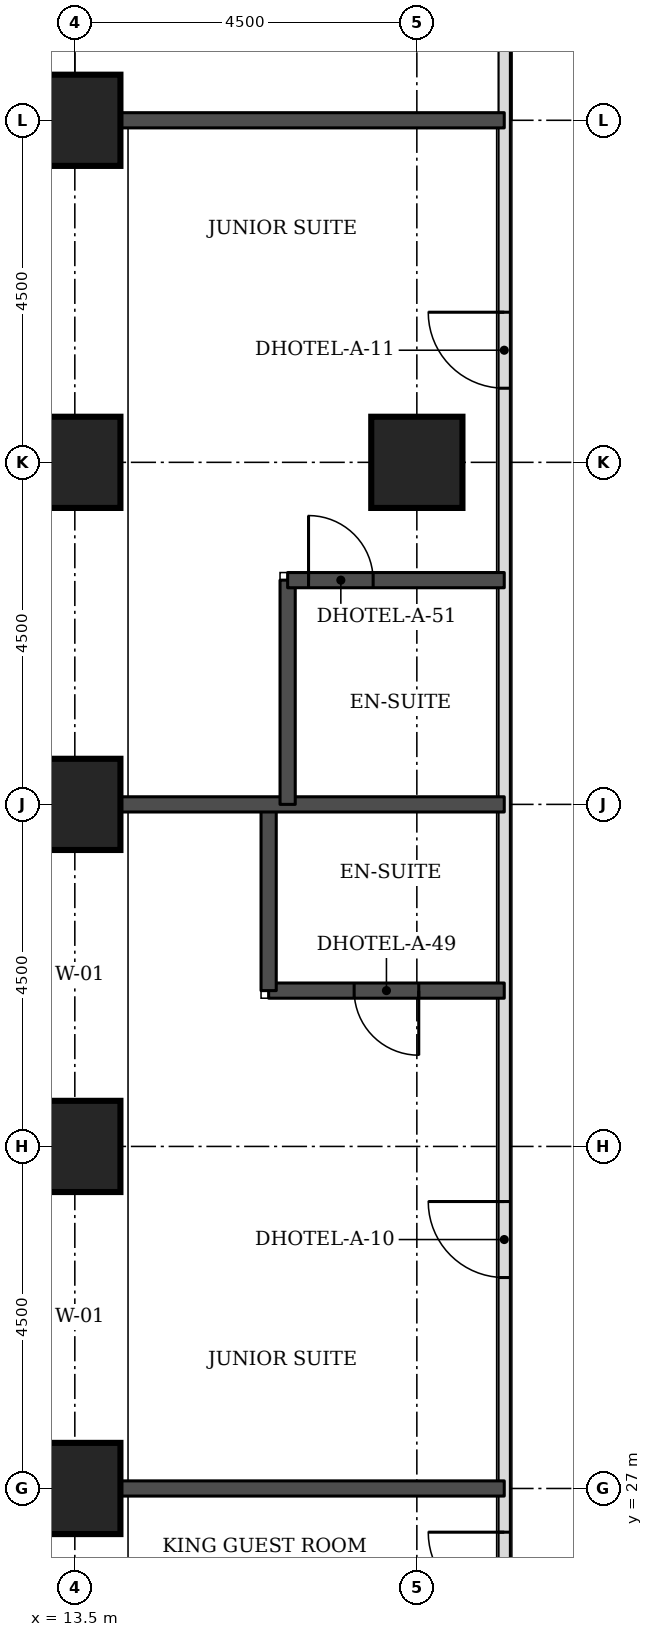
"""IFC4 building model, lengths in metres.
Left out: names, types, materials, properties, quantities, classifications, styles, units other than length and angle.
Written with IfcOpenShell. Run it as: python <this file> out.ifc"""

import sys

from ifc_helpers import new_model, si_unit, direction, frame, frame_2d, origin, origin_2d, place, context, subcontext, project, spatial, rectangle, extrude, element, fill, save


model = new_model("IFC4")
c1 = context("Model", 3, precision=1e-05, world=origin(), true_north=direction((0.0, 1.0)))
c2 = subcontext(c1, "Body", "Model", "MODEL_VIEW")
j1 = project(units=[si_unit("LENGTHUNIT", "METRE"), si_unit("PLANEANGLEUNIT", "RADIAN")], contexts=[c1])
p1 = place(None, origin())
s1 = spatial("IfcSite", under=j1, at=p1, CompositionType="ELEMENT")
p2 = place(p1, origin())
s2 = spatial("IfcBuilding", under=s1, at=p2, CompositionType="ELEMENT")
p3 = place(p2, frame((0.0, 0.0, 49.5)))
s3 = spatial("IfcBuildingStorey", under=s2, at=p3, CompositionType="ELEMENT", Elevation=49.5)
for number, where, z_axis, x_axis in (
    (1, (13.5, 27.0, 0.0), (0.0, 0.0, 1.0), (1.0, 0.0, 0.0)),
    (2, (13.5, 31.5, 0.0), (0.0, 0.0, 1.0), (1.0, 0.0, 0.0)),
    (3, (13.5, 36.0, 0.0), (0.0, 0.0, 1.0), (1.0, 0.0, 0.0)),
    (4, (13.5, 40.5, 0.0), (0.0, 0.0, 1.0), (1.0, 0.0, 0.0)),
    (5, (18.0, 40.5, 0.0), (0.0, 0.0, 1.0), (1.0, 0.0, 0.0)),
    (6, (13.5, 45.0, 0.0), (0.0, 0.0, 1.0), (1.0, 0.0, 0.0)),
):
    element("IfcColumn", number, at=place(p3, frame(where, z_axis=z_axis, x_axis=x_axis)), inside=s3, PredefinedType="COLUMN", context=c2, shape_type="SweptSolid", body=[
        extrude(rectangle(XDim=1.2, YDim=1.2, at=origin_2d()), origin(), (0.0, 0.0, 1.0), 3.3),
    ])
p4 = place(p3, frame((19.15, 23.65, 0.0), z_axis=(0.0, 0.0, 1.0), x_axis=(0.0, 1.0, 0.0)))
e7 = element("IfcWall", 7, at=p4, inside=s3, PredefinedType="PARTITIONING", context=c2, shape_type="SweptSolid", body=[
    extrude(rectangle(XDim=25.85, YDim=0.15, at=frame_2d((12.925, 0.0))), origin(), (0.0, 0.0, 1.0), 3.08),
])
p5 = place(p4, frame((1.775, 0.0, 0.0)))
e8 = element("IfcOpeningElement", 8, at=p5, cuts=e7, PredefinedType="OPENING", context=c2, shape_type="SweptSolid", body=[
    extrude(rectangle(XDim=1.0, YDim=2.1, at=frame_2d((0.5, 1.05))), frame((0.0, 0.085, 0.0), z_axis=(0.0, -1.0, 0.0), x_axis=(1.0, 0.0, 0.0)), (0.0, 0.0, 1.0), 0.17),
])
p6 = place(p4, frame((6.125, 0.0, 0.0)))
e9 = element("IfcOpeningElement", 9, at=p6, cuts=e7, PredefinedType="OPENING", context=c2, shape_type="SweptSolid", body=[
    extrude(rectangle(XDim=1.0, YDim=2.1, at=frame_2d((0.5, 1.05))), frame((0.0, 0.085, 0.0), z_axis=(0.0, -1.0, 0.0), x_axis=(1.0, 0.0, 0.0)), (0.0, 0.0, 1.0), 0.17),
])
p7 = place(p4, frame((17.825, 0.0, 0.0)))
e10 = element("IfcOpeningElement", 10, at=p7, cuts=e7, PredefinedType="OPENING", context=c2, shape_type="SweptSolid", body=[
    extrude(rectangle(XDim=1.0, YDim=2.1, at=frame_2d((0.5, 1.05))), frame((0.0, 0.085, 0.0), z_axis=(0.0, -1.0, 0.0), x_axis=(1.0, 0.0, 0.0)), (0.0, 0.0, 1.0), 0.17),
])
p8 = place(p4, frame((23.04, 0.0, 0.0)))
e11 = element("IfcOpeningElement", 11, at=p8, cuts=e7, PredefinedType="OPENING", context=c2, shape_type="SweptSolid", body=[
    extrude(rectangle(XDim=0.9, YDim=2.1, at=frame_2d((0.45, 1.05))), frame((0.0, 0.085, 0.0), z_axis=(0.0, -1.0, 0.0), x_axis=(1.0, 0.0, 0.0)), (0.0, 0.0, 1.0), 0.17),
])
p9 = place(p3, frame((14.1, 27.0, 0.0), z_axis=(0.0, 0.0, 1.0), x_axis=(1.0, 0.0, 0.0)))
e12 = element("IfcWall", 12, at=p9, inside=s3, PredefinedType="SOLIDWALL", context=c2, shape_type="SweptSolid", body=[
    extrude(rectangle(XDim=5.05, YDim=0.2, at=frame_2d((2.525, 0.0))), origin(), (0.0, 0.0, 1.0), 3.08),
])
p10 = place(p3, frame((16.05, 33.55, 0.0), z_axis=(0.0, 0.0, 1.0), x_axis=(1.0, 0.0, 0.0)))
e13 = element("IfcWall", 13, at=p10, inside=s3, PredefinedType="SOLIDWALL", context=c2, shape_type="SweptSolid", body=[
    extrude(rectangle(XDim=3.1, YDim=0.2, at=frame_2d((1.55, 0.0))), origin(), (0.0, 0.0, 1.0), 3.08),
])
p11 = place(p10, frame((1.125, 0.0, 0.0)))
e14 = element("IfcOpeningElement", 14, at=p11, cuts=e13, PredefinedType="OPENING", context=c2, shape_type="SweptSolid", body=[
    extrude(rectangle(XDim=0.85, YDim=2.1, at=frame_2d((0.425, 1.05))), frame((0.0, 0.11, 0.0), z_axis=(0.0, -1.0, 0.0), x_axis=(1.0, 0.0, 0.0)), (0.0, 0.0, 1.0), 0.22),
])
p12 = place(p3, frame((16.05, 33.55, 0.0), z_axis=(0.0, 0.0, 1.0), x_axis=(0.0, 1.0, 0.0)))
e15 = element("IfcWall", 15, at=p12, inside=s3, PredefinedType="SOLIDWALL", context=c2, shape_type="SweptSolid", body=[
    extrude(rectangle(XDim=2.45, YDim=0.2, at=frame_2d((1.225, 0.0))), origin(), (0.0, 0.0, 1.0), 3.08),
])
p13 = place(p3, frame((14.1, 36.0, 0.0), z_axis=(0.0, 0.0, 1.0), x_axis=(1.0, 0.0, 0.0)))
e16 = element("IfcWall", 16, at=p13, inside=s3, PredefinedType="SOLIDWALL", context=c2, shape_type="SweptSolid", body=[
    extrude(rectangle(XDim=5.05, YDim=0.2, at=frame_2d((2.525, 0.0))), origin(), (0.0, 0.0, 1.0), 3.08),
])
p14 = place(p3, frame((16.3, 36.0, 0.0), z_axis=(0.0, 0.0, 1.0), x_axis=(0.0, 1.0, 0.0)))
e17 = element("IfcWall", 17, at=p14, inside=s3, PredefinedType="SOLIDWALL", context=c2, shape_type="SweptSolid", body=[
    extrude(rectangle(XDim=2.95, YDim=0.2, at=frame_2d((1.475, 0.0))), origin(), (0.0, 0.0, 1.0), 3.08),
])
p15 = place(p3, frame((16.3, 38.95, 0.0), z_axis=(0.0, 0.0, 1.0), x_axis=(1.0, 0.0, 0.0)))
e18 = element("IfcWall", 18, at=p15, inside=s3, PredefinedType="SOLIDWALL", context=c2, shape_type="SweptSolid", body=[
    extrude(rectangle(XDim=2.85, YDim=0.2, at=frame_2d((1.425, 0.0))), origin(), (0.0, 0.0, 1.0), 3.08),
])
p16 = place(p15, frame((0.275, 0.0, 0.0)))
e19 = element("IfcOpeningElement", 19, at=p16, cuts=e18, PredefinedType="OPENING", context=c2, shape_type="SweptSolid", body=[
    extrude(rectangle(XDim=0.85, YDim=2.1, at=frame_2d((0.425, 1.05))), frame((0.0, 0.11, 0.0), z_axis=(0.0, -1.0, 0.0), x_axis=(1.0, 0.0, 0.0)), (0.0, 0.0, 1.0), 0.22),
])
p17 = place(p3, frame((14.1, 45.0, 0.0), z_axis=(0.0, 0.0, 1.0), x_axis=(1.0, 0.0, 0.0)))
e20 = element("IfcWall", 20, at=p17, inside=s3, PredefinedType="SOLIDWALL", context=c2, shape_type="SweptSolid", body=[
    extrude(rectangle(XDim=5.05, YDim=0.2, at=frame_2d((2.525, 0.0))), origin(), (0.0, 0.0, 1.0), 3.08),
])
p18 = place(p5, origin())
e21 = element("IfcDoor", 21, at=p18, inside=s3, OperationType="SINGLE_SWING_RIGHT", PredefinedType="DOOR", context=c2, shape_type="SweptSolid", body=[
    extrude(rectangle(XDim=1.0, YDim=2.1, at=frame_2d((0.5, 1.05))), frame((0.0, 0.025, 0.0), z_axis=(0.0, -1.0, 0.0), x_axis=(1.0, 0.0, 0.0)), (0.0, 0.0, 1.0), 0.05),
])
fill(e8, e21)
p19 = place(p6, origin())
e22 = element("IfcDoor", 22, at=p19, inside=s3, OperationType="SINGLE_SWING_RIGHT", PredefinedType="DOOR", context=c2, shape_type="SweptSolid", body=[
    extrude(rectangle(XDim=1.0, YDim=2.1, at=frame_2d((0.5, 1.05))), frame((0.0, 0.025, 0.0), z_axis=(0.0, -1.0, 0.0), x_axis=(1.0, 0.0, 0.0)), (0.0, 0.0, 1.0), 0.05),
])
fill(e9, e22)
p20 = place(p11, frame((0.85, 0.0, 0.0), z_axis=(0.0, 0.0, 1.0), x_axis=(-1.0, 0.0, 0.0)))
e23 = element("IfcDoor", 23, at=p20, inside=s3, OperationType="SINGLE_SWING_LEFT", PredefinedType="DOOR", context=c2, shape_type="SweptSolid", body=[
    extrude(rectangle(XDim=0.85, YDim=2.1, at=frame_2d((0.425, 1.05))), frame((0.0, 0.025, 0.0), z_axis=(0.0, -1.0, 0.0), x_axis=(1.0, 0.0, 0.0)), (0.0, 0.0, 1.0), 0.05),
])
fill(e14, e23)
p21 = place(p7, origin())
e24 = element("IfcDoor", 24, at=p21, inside=s3, OperationType="SINGLE_SWING_RIGHT", PredefinedType="DOOR", context=c2, shape_type="SweptSolid", body=[
    extrude(rectangle(XDim=1.0, YDim=2.1, at=frame_2d((0.5, 1.05))), frame((0.0, 0.025, 0.0), z_axis=(0.0, -1.0, 0.0), x_axis=(1.0, 0.0, 0.0)), (0.0, 0.0, 1.0), 0.05),
])
fill(e10, e24)
p22 = place(p16, origin())
e25 = element("IfcDoor", 25, at=p22, inside=s3, OperationType="SINGLE_SWING_LEFT", PredefinedType="DOOR", context=c2, shape_type="SweptSolid", body=[
    extrude(rectangle(XDim=0.85, YDim=2.1, at=frame_2d((0.425, 1.05))), frame((0.0, 0.025, 0.0), z_axis=(0.0, -1.0, 0.0), x_axis=(1.0, 0.0, 0.0)), (0.0, 0.0, 1.0), 0.05),
])
fill(e19, e25)
save(model, sys.argv[1])
